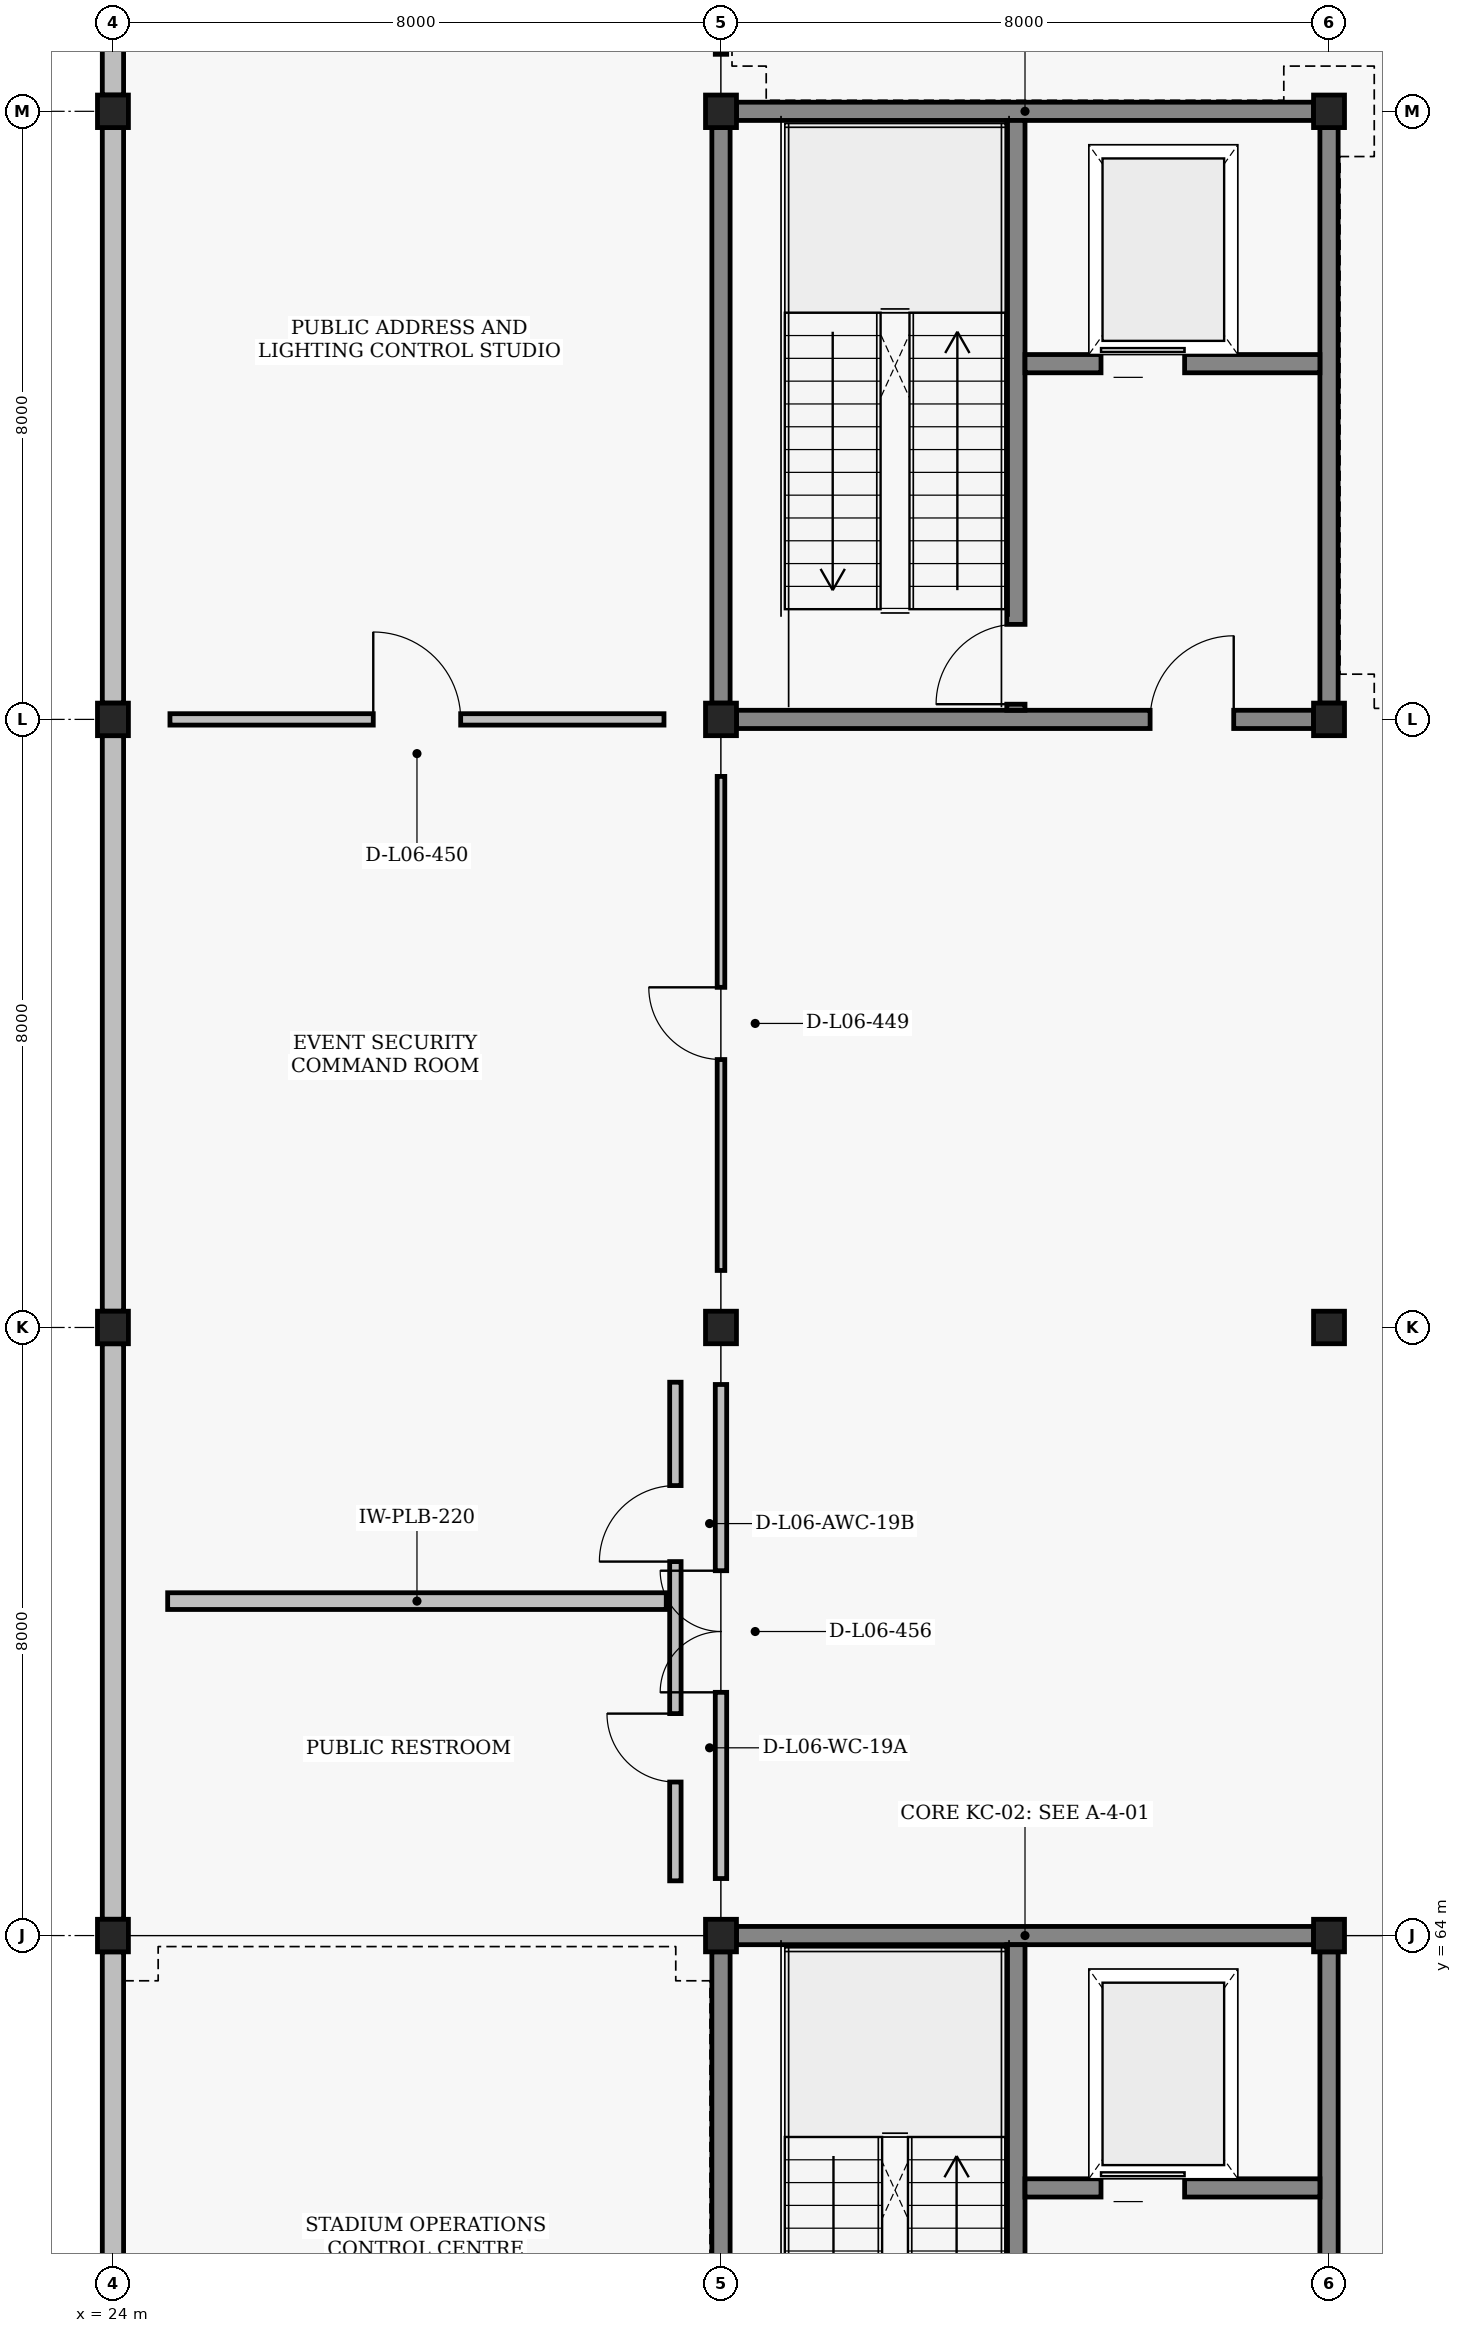
"""IFC4 building model, lengths in metres.
Left out: names, types, materials, properties, quantities, classifications, styles, units other than length and angle.
Written with IfcOpenShell. Run it as: python <this file> out.ifc"""

import sys

from ifc_helpers import new_model, si_unit, direction, frame, frame_2d, origin, origin_2d, place, context, subcontext, project, spatial, rectangle, i_section, extrude, element, fill, save


model = new_model("IFC4")
c1 = context("Model", 3, precision=1e-05, world=origin(), true_north=direction((0.0, 1.0)))
c2 = subcontext(c1, "Body", "Model", "MODEL_VIEW")
j1 = project(units=[si_unit("LENGTHUNIT", "METRE"), si_unit("PLANEANGLEUNIT", "RADIAN")], contexts=[c1])
p1 = place(None, origin())
s1 = spatial("IfcSite", under=j1, at=p1, CompositionType="ELEMENT")
p2 = place(p1, origin())
s2 = spatial("IfcBuilding", under=s1, at=p2, CompositionType="ELEMENT")
p3 = place(p2, frame((0.0, 0.0, 22.8)))
s3 = spatial("IfcBuildingStorey", under=s2, at=p3, CompositionType="ELEMENT", Elevation=22.8)
for number, where, z_axis, x_axis in (
    (1, (24.0, 64.0, 0.0), (0.0, 0.0, 1.0), (1.0, 0.0, 0.0)),
    (2, (24.0, 72.0, 0.0), (0.0, 0.0, 1.0), (1.0, 0.0, 0.0)),
    (3, (24.0, 80.0, 0.0), (0.0, 0.0, 1.0), (1.0, 0.0, 0.0)),
    (4, (24.0, 88.0, 0.0), (0.0, 0.0, 1.0), (1.0, 0.0, 0.0)),
    (5, (32.0, 64.0, 0.0), (0.0, 0.0, 1.0), (1.0, 0.0, 0.0)),
    (6, (32.0, 72.0, 0.0), (0.0, 0.0, 1.0), (1.0, 0.0, 0.0)),
    (7, (32.0, 80.0, 0.0), (0.0, 0.0, 1.0), (1.0, 0.0, 0.0)),
    (8, (32.0, 88.0, 0.0), (0.0, 0.0, 1.0), (1.0, 0.0, 0.0)),
    (9, (40.0, 64.0, 0.0), (0.0, 0.0, 1.0), (1.0, 0.0, 0.0)),
    (10, (40.0, 72.0, 0.0), (0.0, 0.0, 1.0), (1.0, 0.0, 0.0)),
    (11, (40.0, 80.0, 0.0), (0.0, 0.0, 1.0), (1.0, 0.0, 0.0)),
    (12, (40.0, 88.0, 0.0), (0.0, 0.0, 1.0), (1.0, 0.0, 0.0)),
):
    element("IfcColumn", number, at=place(p3, frame(where, z_axis=z_axis, x_axis=x_axis)), inside=s3, PredefinedType="COLUMN", context=c2, shape_type="SweptSolid", body=[
        extrude(i_section(OverallWidth=0.407, OverallDepth=0.428, WebThickness=0.02, FlangeThickness=0.035, at=origin_2d()), origin(), (0.0, 0.0, 1.0), 4.2),
    ])
for number, where, z_axis, x_axis in (
    (13, (24.0, 56.214, 0.0), (0.0, 0.0, 1.0), (0.0, 1.0, 0.0)),
    (14, (24.0, 64.214, 0.0), (0.0, 0.0, 1.0), (0.0, 1.0, 0.0)),
    (15, (24.0, 72.214, 0.0), (0.0, 0.0, 1.0), (0.0, 1.0, 0.0)),
    (16, (24.0, 80.214, 0.0), (0.0, 0.0, 1.0), (0.0, 1.0, 0.0)),
    (17, (24.0, 88.214, 0.0), (0.0, 0.0, 1.0), (0.0, 1.0, 0.0)),
):
    element("IfcWall", number, at=place(p3, frame(where, z_axis=z_axis, x_axis=x_axis)), inside=s3, PredefinedType="SOLIDWALL", context=c2, shape_type="SweptSolid", body=[
        extrude(rectangle(XDim=7.572, YDim=0.28, at=frame_2d((3.786, 0.0))), origin(), (0.0, 0.0, 1.0), 3.34),
    ])
p4 = place(p3, frame((32.204, 64.0, 0.0), z_axis=(0.0, 0.0, 1.0), x_axis=(1.0, 0.0, 0.0)))
e18 = element("IfcWall", 18, at=p4, inside=s3, PredefinedType="SHEAR", context=c2, shape_type="SweptSolid", body=[
    extrude(rectangle(XDim=7.592, YDim=0.24, at=frame_2d((3.796, 0.0))), origin(), (0.0, 0.0, 1.0), 3.34),
])
for number, where, z_axis, x_axis in (
    (19, (32.0, 56.214, 0.0), (0.0, 0.0, 1.0), (0.0, 1.0, 0.0)),
    (20, (40.0, 56.214, 0.0), (0.0, 0.0, 1.0), (0.0, 1.0, 0.0)),
):
    element("IfcWall", number, at=place(p3, frame(where, z_axis=z_axis, x_axis=x_axis)), inside=s3, PredefinedType="SHEAR", context=c2, shape_type="SweptSolid", body=[
        extrude(rectangle(XDim=7.572, YDim=0.24, at=frame_2d((3.786, 0.0))), origin(), (0.0, 0.0, 1.0), 3.34),
    ])
p5 = place(p3, frame((35.88, 56.12, 0.0), z_axis=(0.0, 0.0, 1.0), x_axis=(0.0, 1.0, 0.0)))
e21 = element("IfcWall", 21, at=p5, inside=s3, PredefinedType="SHEAR", context=c2, shape_type="SweptSolid", body=[
    extrude(rectangle(XDim=7.76, YDim=0.24, at=frame_2d((3.88, 0.0))), origin(), (0.0, 0.0, 1.0), 3.44),
])
p6 = place(p5, frame((0.08, 0.0, 0.0)))
e22 = element("IfcOpeningElement", 22, at=p6, cuts=e21, PredefinedType="OPENING", context=c2, shape_type="SweptSolid", body=[
    extrude(rectangle(XDim=1.05, YDim=2.15, at=frame_2d((0.525, 1.075))), frame((0.0, 0.13, 0.0), z_axis=(0.0, -1.0, 0.0), x_axis=(1.0, 0.0, 0.0)), (0.0, 0.0, 1.0), 0.26),
])
p7 = place(p3, frame((36.0, 60.68, 0.0), z_axis=(0.0, 0.0, 1.0), x_axis=(1.0, 0.0, 0.0)))
e23 = element("IfcWall", 23, at=p7, inside=s3, PredefinedType="SHEAR", context=c2, shape_type="SweptSolid", body=[
    extrude(rectangle(XDim=3.88, YDim=0.24, at=frame_2d((1.94, 0.0))), origin(), (0.0, 0.0, 1.0), 3.34),
])
p8 = place(p7, frame((1.0, 0.0, 0.0)))
e24 = element("IfcOpeningElement", 24, at=p8, cuts=e23, PredefinedType="OPENING", context=c2, shape_type="SweptSolid", body=[
    extrude(rectangle(XDim=1.1, YDim=2.15, at=frame_2d((0.55, 1.075))), frame((0.0, 0.13, 0.0), z_axis=(0.0, -1.0, 0.0), x_axis=(1.0, 0.0, 0.0)), (0.0, 0.0, 1.0), 0.26),
])
p9 = place(p3, frame((32.204, 80.0, 0.0), z_axis=(0.0, 0.0, 1.0), x_axis=(1.0, 0.0, 0.0)))
e25 = element("IfcWall", 25, at=p9, inside=s3, PredefinedType="SHEAR", context=c2, shape_type="SweptSolid", body=[
    extrude(rectangle(XDim=7.592, YDim=0.24, at=frame_2d((3.796, 0.0))), origin(), (0.0, 0.0, 1.0), 3.34),
])
p10 = place(p9, frame((5.442, 0.0, 0.0)))
e26 = element("IfcOpeningElement", 26, at=p10, cuts=e25, PredefinedType="OPENING", context=c2, shape_type="SweptSolid", body=[
    extrude(rectangle(XDim=1.1, YDim=2.2, at=frame_2d((0.55, 1.1))), frame((0.0, 0.13, 0.0), z_axis=(0.0, -1.0, 0.0), x_axis=(1.0, 0.0, 0.0)), (0.0, 0.0, 1.0), 0.26),
])
p11 = place(p3, frame((32.204, 88.0, 0.0), z_axis=(0.0, 0.0, 1.0), x_axis=(1.0, 0.0, 0.0)))
e27 = element("IfcWall", 27, at=p11, inside=s3, PredefinedType="SHEAR", context=c2, shape_type="SweptSolid", body=[
    extrude(rectangle(XDim=7.592, YDim=0.24, at=frame_2d((3.796, 0.0))), origin(), (0.0, 0.0, 1.0), 3.34),
])
for number, where, z_axis, x_axis in (
    (28, (32.0, 80.214, 0.0), (0.0, 0.0, 1.0), (0.0, 1.0, 0.0)),
    (29, (40.0, 80.214, 0.0), (0.0, 0.0, 1.0), (0.0, 1.0, 0.0)),
):
    element("IfcWall", number, at=place(p3, frame(where, z_axis=z_axis, x_axis=x_axis)), inside=s3, PredefinedType="SHEAR", context=c2, shape_type="SweptSolid", body=[
        extrude(rectangle(XDim=7.572, YDim=0.24, at=frame_2d((3.786, 0.0))), origin(), (0.0, 0.0, 1.0), 3.34),
    ])
p12 = place(p3, frame((35.88, 80.12, 0.0), z_axis=(0.0, 0.0, 1.0), x_axis=(0.0, 1.0, 0.0)))
e30 = element("IfcWall", 30, at=p12, inside=s3, PredefinedType="SHEAR", context=c2, shape_type="SweptSolid", body=[
    extrude(rectangle(XDim=7.76, YDim=0.24, at=frame_2d((3.88, 0.0))), origin(), (0.0, 0.0, 1.0), 3.44),
])
p13 = place(p12, frame((0.08, 0.0, 0.0)))
e31 = element("IfcOpeningElement", 31, at=p13, cuts=e30, PredefinedType="OPENING", context=c2, shape_type="SweptSolid", body=[
    extrude(rectangle(XDim=1.05, YDim=2.15, at=frame_2d((0.525, 1.075))), frame((0.0, 0.13, 0.0), z_axis=(0.0, -1.0, 0.0), x_axis=(1.0, 0.0, 0.0)), (0.0, 0.0, 1.0), 0.26),
])
p14 = place(p3, frame((36.0, 84.68, 0.0), z_axis=(0.0, 0.0, 1.0), x_axis=(1.0, 0.0, 0.0)))
e32 = element("IfcWall", 32, at=p14, inside=s3, PredefinedType="SHEAR", context=c2, shape_type="SweptSolid", body=[
    extrude(rectangle(XDim=3.88, YDim=0.24, at=frame_2d((1.94, 0.0))), origin(), (0.0, 0.0, 1.0), 3.34),
])
p15 = place(p14, frame((1.0, 0.0, 0.0)))
e33 = element("IfcOpeningElement", 33, at=p15, cuts=e32, PredefinedType="OPENING", context=c2, shape_type="SweptSolid", body=[
    extrude(rectangle(XDim=1.1, YDim=2.15, at=frame_2d((0.55, 1.075))), frame((0.0, 0.13, 0.0), z_axis=(0.0, -1.0, 0.0), x_axis=(1.0, 0.0, 0.0)), (0.0, 0.0, 1.0), 0.26),
])
p16 = place(p3, frame((24.72, 68.4, 0.0), z_axis=(0.0, 0.0, 1.0), x_axis=(1.0, 0.0, 0.0)))
e34 = element("IfcWall", 34, at=p16, inside=s3, PredefinedType="PLUMBINGWALL", context=c2, shape_type="SweptSolid", body=[
    extrude(rectangle(XDim=6.56, YDim=0.22, at=frame_2d((3.28, 0.0))), origin(), (0.0, 0.0, 1.0), 3.64),
])
p17 = place(p3, frame((31.4, 64.72, 0.0), z_axis=(0.0, 0.0, 1.0), x_axis=(0.0, 1.0, 0.0)))
e35 = element("IfcWall", 35, at=p17, inside=s3, PredefinedType="PARTITIONING", context=c2, shape_type="SweptSolid", body=[
    extrude(rectangle(XDim=6.56, YDim=0.15, at=frame_2d((3.28, 0.0))), origin(), (0.0, 0.0, 1.0), 3.64),
])
p18 = place(p17, frame((1.3, 0.0, 0.0)))
e36 = element("IfcOpeningElement", 36, at=p18, cuts=e35, PredefinedType="OPENING", context=c2, shape_type="SweptSolid", body=[
    extrude(rectangle(XDim=0.9, YDim=2.1, at=frame_2d((0.45, 1.05))), frame((0.0, 0.085, 0.0), z_axis=(0.0, -1.0, 0.0), x_axis=(1.0, 0.0, 0.0)), (0.0, 0.0, 1.0), 0.17),
])
p19 = place(p17, frame((4.2, 0.0, 0.0)))
e37 = element("IfcOpeningElement", 37, at=p19, cuts=e35, PredefinedType="OPENING", context=c2, shape_type="SweptSolid", body=[
    extrude(rectangle(XDim=1.0, YDim=2.15, at=frame_2d((0.5, 1.075))), frame((0.0, 0.085, 0.0), z_axis=(0.0, -1.0, 0.0), x_axis=(1.0, 0.0, 0.0)), (0.0, 0.0, 1.0), 0.17),
])
p20 = place(p3, frame((32.0, 72.75, 0.0), z_axis=(0.0, 0.0, 1.0), x_axis=(0.0, 1.0, 0.0)))
e38 = element("IfcWall", 38, at=p20, inside=s3, PredefinedType="PARTITIONING", context=c2, shape_type="SweptSolid", body=[
    extrude(rectangle(XDim=6.5, YDim=0.1, at=frame_2d((3.25, 0.0))), origin(), (0.0, 0.0, 1.0), 3.34),
])
p21 = place(p20, frame((2.775, 0.0, 0.0)))
e39 = element("IfcOpeningElement", 39, at=p21, cuts=e38, PredefinedType="OPENING", context=c2, shape_type="SweptSolid", body=[
    extrude(rectangle(XDim=0.95, YDim=2.1, at=frame_2d((0.475, 1.05))), frame((0.0, 0.06, 0.0), z_axis=(0.0, -1.0, 0.0), x_axis=(1.0, 0.0, 0.0)), (0.0, 0.0, 1.0), 0.12),
])
p22 = place(p3, frame((24.75, 80.0, 0.0), z_axis=(0.0, 0.0, 1.0), x_axis=(1.0, 0.0, 0.0)))
e40 = element("IfcWall", 40, at=p22, inside=s3, PredefinedType="PARTITIONING", context=c2, shape_type="SweptSolid", body=[
    extrude(rectangle(XDim=6.5, YDim=0.15, at=frame_2d((3.25, 0.0))), origin(), (0.0, 0.0, 1.0), 3.44),
])
p23 = place(p22, frame((2.675, 0.0, 0.0)))
e41 = element("IfcOpeningElement", 41, at=p23, cuts=e40, PredefinedType="OPENING", context=c2, shape_type="SweptSolid", body=[
    extrude(rectangle(XDim=1.15, YDim=2.15, at=frame_2d((0.575, 1.075))), frame((0.0, 0.085, 0.0), z_axis=(0.0, -1.0, 0.0), x_axis=(1.0, 0.0, 0.0)), (0.0, 0.0, 1.0), 0.17),
])
p24 = place(p3, frame((32.0, 64.75, 0.0), z_axis=(0.0, 0.0, 1.0), x_axis=(0.0, 1.0, 0.0)))
e42 = element("IfcWall", 42, at=p24, inside=s3, PredefinedType="PARTITIONING", context=c2, shape_type="SweptSolid", body=[
    extrude(rectangle(XDim=6.5, YDim=0.15, at=frame_2d((3.25, 0.0))), origin(), (0.0, 0.0, 1.0), 3.34),
])
p25 = place(p24, frame((2.45, 0.0, 0.0)))
e43 = element("IfcOpeningElement", 43, at=p25, cuts=e42, PredefinedType="OPENING", context=c2, shape_type="SweptSolid", body=[
    extrude(rectangle(XDim=1.6, YDim=2.2, at=frame_2d((0.8, 1.1))), frame((0.0, 0.085, 0.0), z_axis=(0.0, -1.0, 0.0), x_axis=(1.0, 0.0, 0.0)), (0.0, 0.0, 1.0), 0.17),
])
p26 = place(p3, frame((32.0, 88.75, 0.0), z_axis=(0.0, 0.0, 1.0), x_axis=(0.0, 1.0, 0.0)))
e44 = element("IfcWall", 44, at=p26, inside=s3, PredefinedType="PARTITIONING", context=c2, shape_type="SweptSolid", body=[
    extrude(rectangle(XDim=6.5, YDim=0.15, at=frame_2d((3.25, 0.0))), origin(), (0.0, 0.0, 1.0), 3.34),
])
p27 = place(p26, frame((2.725, 0.0, 0.0)))
e45 = element("IfcOpeningElement", 45, at=p27, cuts=e44, PredefinedType="OPENING", context=c2, shape_type="SweptSolid", body=[
    extrude(rectangle(XDim=1.05, YDim=2.15, at=frame_2d((0.525, 1.075))), frame((0.0, 0.085, 0.0), z_axis=(0.0, -1.0, 0.0), x_axis=(1.0, 0.0, 0.0)), (0.0, 0.0, 1.0), 0.17),
])
p28 = place(p8, origin())
e46 = element("IfcDoor", 46, at=p28, inside=s3, OperationType="SLIDING_TO_LEFT", PredefinedType="DOOR", context=c2, shape_type="SweptSolid", body=[
    extrude(rectangle(XDim=1.1, YDim=2.15, at=frame_2d((0.55, 1.075))), frame((0.0, 0.025, 0.0), z_axis=(0.0, -1.0, 0.0), x_axis=(1.0, 0.0, 0.0)), (0.0, 0.0, 1.0), 0.05),
])
fill(e24, e46)
p29 = place(p10, origin())
e47 = element("IfcDoor", 47, at=p29, inside=s3, OperationType="SINGLE_SWING_RIGHT", PredefinedType="DOOR", context=c2, shape_type="SweptSolid", body=[
    extrude(rectangle(XDim=1.1, YDim=2.2, at=frame_2d((0.55, 1.1))), frame((0.0, 0.025, 0.0), z_axis=(0.0, -1.0, 0.0), x_axis=(1.0, 0.0, 0.0)), (0.0, 0.0, 1.0), 0.05),
])
fill(e26, e47)
p30 = place(p13, origin())
e48 = element("IfcDoor", 48, at=p30, inside=s3, OperationType="SINGLE_SWING_LEFT", PredefinedType="DOOR", context=c2, shape_type="SweptSolid", body=[
    extrude(rectangle(XDim=1.05, YDim=2.15, at=frame_2d((0.525, 1.075))), frame((0.0, 0.025, 0.0), z_axis=(0.0, -1.0, 0.0), x_axis=(1.0, 0.0, 0.0)), (0.0, 0.0, 1.0), 0.05),
])
fill(e31, e48)
p31 = place(p15, origin())
e49 = element("IfcDoor", 49, at=p31, inside=s3, OperationType="SLIDING_TO_LEFT", PredefinedType="DOOR", context=c2, shape_type="SweptSolid", body=[
    extrude(rectangle(XDim=1.1, YDim=2.15, at=frame_2d((0.55, 1.075))), frame((0.0, 0.025, 0.0), z_axis=(0.0, -1.0, 0.0), x_axis=(1.0, 0.0, 0.0)), (0.0, 0.0, 1.0), 0.05),
])
fill(e33, e49)
p32 = place(p18, origin())
e50 = element("IfcDoor", 50, at=p32, inside=s3, OperationType="SINGLE_SWING_RIGHT", PredefinedType="DOOR", context=c2, shape_type="SweptSolid", body=[
    extrude(rectangle(XDim=0.9, YDim=2.1, at=frame_2d((0.45, 1.05))), frame((0.0, 0.025, 0.0), z_axis=(0.0, -1.0, 0.0), x_axis=(1.0, 0.0, 0.0)), (0.0, 0.0, 1.0), 0.05),
])
fill(e36, e50)
p33 = place(p19, origin())
e51 = element("IfcDoor", 51, at=p33, inside=s3, OperationType="SINGLE_SWING_LEFT", PredefinedType="DOOR", context=c2, shape_type="SweptSolid", body=[
    extrude(rectangle(XDim=1.0, YDim=2.15, at=frame_2d((0.5, 1.075))), frame((0.0, 0.025, 0.0), z_axis=(0.0, -1.0, 0.0), x_axis=(1.0, 0.0, 0.0)), (0.0, 0.0, 1.0), 0.05),
])
fill(e37, e51)
p34 = place(p21, origin())
e52 = element("IfcDoor", 52, at=p34, inside=s3, OperationType="SINGLE_SWING_RIGHT", PredefinedType="DOOR", context=c2, shape_type="SweptSolid", body=[
    extrude(rectangle(XDim=0.95, YDim=2.1, at=frame_2d((0.475, 1.05))), frame((0.0, 0.025, 0.0), z_axis=(0.0, -1.0, 0.0), x_axis=(1.0, 0.0, 0.0)), (0.0, 0.0, 1.0), 0.05),
])
fill(e39, e52)
p35 = place(p23, origin())
e53 = element("IfcDoor", 53, at=p35, inside=s3, OperationType="SINGLE_SWING_LEFT", PredefinedType="DOOR", context=c2, shape_type="SweptSolid", body=[
    extrude(rectangle(XDim=1.15, YDim=2.15, at=frame_2d((0.575, 1.075))), frame((0.0, 0.025, 0.0), z_axis=(0.0, -1.0, 0.0), x_axis=(1.0, 0.0, 0.0)), (0.0, 0.0, 1.0), 0.05),
])
fill(e41, e53)
p36 = place(p25, origin())
e54 = element("IfcDoor", 54, at=p36, inside=s3, OperationType="DOUBLE_SWING_LEFT", PredefinedType="DOOR", context=c2, shape_type="SweptSolid", body=[
    extrude(rectangle(XDim=1.6, YDim=2.2, at=frame_2d((0.8, 1.1))), frame((0.0, 0.025, 0.0), z_axis=(0.0, -1.0, 0.0), x_axis=(1.0, 0.0, 0.0)), (0.0, 0.0, 1.0), 0.05),
])
fill(e43, e54)
save(model, sys.argv[1])
